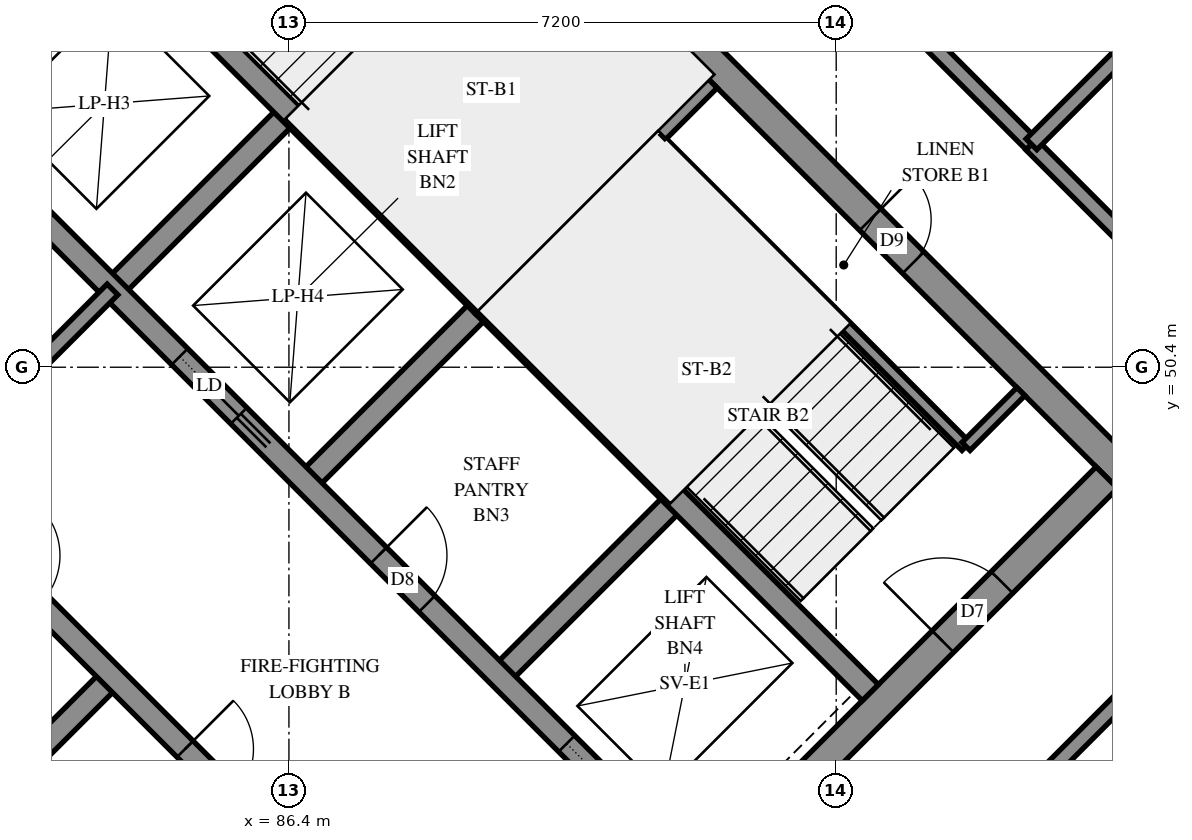
"""IFC4 building model, lengths in metres.
Left out: names, types, materials, properties, quantities, classifications, styles, units other than length and angle.
Written with IfcOpenShell. Run it as: python <this file> out.ifc"""

import sys

from ifc_helpers import new_model, si_unit, direction, frame, frame_2d, origin, place, context, subcontext, project, spatial, polyline, rectangle, outline, extrude, element, fill, save


model = new_model("IFC4")
c1 = context("Model", 3, precision=1e-05, world=origin(), true_north=direction((0.0, 1.0)))
c2 = subcontext(c1, "Body", "Model", "MODEL_VIEW")
j1 = project(units=[si_unit("LENGTHUNIT", "METRE"), si_unit("PLANEANGLEUNIT", "RADIAN")], contexts=[c1])
p1 = place(None, origin())
s1 = spatial("IfcSite", under=j1, at=p1, CompositionType="ELEMENT")
p2 = place(p1, origin())
s2 = spatial("IfcBuilding", under=s1, at=p2, CompositionType="ELEMENT")
p3 = place(p2, frame((0.0, 0.0, 274.4)))
s3 = spatial("IfcBuildingStorey", under=s2, at=p3, CompositionType="ELEMENT", Elevation=274.4)
p4 = place(p3, frame((76.23, 49.231, -0.3), z_axis=(0.0, 0.0, 1.0), x_axis=(0.7071034917, -0.7071100706, 0.0)))
e1 = element("IfcWall", 1, at=p4, inside=s3, PredefinedType="SHEAR", context=c2, shape_type="SweptSolid", body=[
    extrude(rectangle(XDim=15.2, YDim=0.4, at=frame_2d((7.6, 0.0))), origin(), (0.0, 0.0, 1.0), 2.7),
])
p5 = place(p3, frame((86.695, 59.696, -0.3), z_axis=(0.0, 0.0, 1.0), x_axis=(0.7071100706, -0.7071034917, 0.0)))
e2 = element("IfcWall", 2, at=p5, inside=s3, PredefinedType="SHEAR", context=c2, shape_type="SweptSolid", body=[
    extrude(rectangle(XDim=15.2, YDim=0.4, at=frame_2d((7.6, 0.0))), origin(), (0.0, 0.0, 1.0), 2.7),
])
p6 = place(p5, frame((10.4, 0.0, 0.3)))
e3 = element("IfcOpeningElement", 3, at=p6, cuts=e2, PredefinedType="OPENING", context=c2, shape_type="SweptSolid", body=[
    extrude(rectangle(XDim=0.8, YDim=2.1, at=frame_2d((0.4, 1.05))), frame((0.0, 0.21, 0.0), z_axis=(0.0, -1.0, 0.0), x_axis=(1.0, 0.0, 0.0)), (0.0, 0.0, 1.0), 0.42),
])
p7 = place(p3, frame((76.513, 49.231, -0.3), z_axis=(0.0, 0.0, 1.0), x_axis=(0.7071067812, 0.7071067812, 0.0)))
e4 = element("IfcWall", 4, at=p7, inside=s3, PredefinedType="SHEAR", context=c2, shape_type="SweptSolid", body=[
    extrude(rectangle(XDim=14.4, YDim=0.4, at=frame_2d((7.2, 0.0))), origin(), (0.0, 0.0, 1.0), 2.7),
])
p8 = place(p7, frame((4.55, 0.0, 0.3)))
e5 = element("IfcOpeningElement", 5, at=p8, cuts=e4, PredefinedType="OPENING", context=c2, shape_type="SweptSolid", body=[
    extrude(rectangle(XDim=1.1, YDim=2.1, at=frame_2d((0.55, 1.05))), frame((0.0, 0.21, 0.0), z_axis=(0.0, -1.0, 0.0), x_axis=(1.0, 0.0, 0.0)), (0.0, 0.0, 1.0), 0.42),
])
p9 = place(p7, frame((11.35, 0.0, 0.3)))
e6 = element("IfcOpeningElement", 6, at=p9, cuts=e4, PredefinedType="OPENING", context=c2, shape_type="SweptSolid", body=[
    extrude(rectangle(XDim=1.1, YDim=2.1, at=frame_2d((0.55, 1.05))), frame((0.0, 0.21, 0.0), z_axis=(0.0, -1.0, 0.0), x_axis=(1.0, 0.0, 0.0)), (0.0, 0.0, 1.0), 0.42),
])
p10 = place(p3, frame((86.978, 38.766, -0.3), z_axis=(0.0, 0.0, 1.0), x_axis=(0.7071067812, 0.7071067812, 0.0)))
e7 = element("IfcWall", 7, at=p10, inside=s3, PredefinedType="SHEAR", context=c2, shape_type="SweptSolid", body=[
    extrude(rectangle(XDim=14.4, YDim=0.4, at=frame_2d((7.2, 0.0))), origin(), (0.0, 0.0, 1.0), 2.7),
])
p11 = place(p10, frame((4.55, 0.0, 0.3)))
e8 = element("IfcOpeningElement", 8, at=p11, cuts=e7, PredefinedType="OPENING", context=c2, shape_type="SweptSolid", body=[
    extrude(rectangle(XDim=1.1, YDim=2.1, at=frame_2d((0.55, 1.05))), frame((0.0, 0.21, 0.0), z_axis=(0.0, -1.0, 0.0), x_axis=(1.0, 0.0, 0.0)), (0.0, 0.0, 1.0), 0.42),
])
p12 = place(p10, frame((11.35, 0.0, 0.3)))
e9 = element("IfcOpeningElement", 9, at=p12, cuts=e7, PredefinedType="OPENING", context=c2, shape_type="SweptSolid", body=[
    extrude(rectangle(XDim=1.1, YDim=2.1, at=frame_2d((0.55, 1.05))), frame((0.0, 0.21, 0.0), z_axis=(0.0, -1.0, 0.0), x_axis=(1.0, 0.0, 0.0)), (0.0, 0.0, 1.0), 0.42),
])
p13 = place(p3, frame((84.079, 51.423, 0.0), z_axis=(0.0, 0.0, 1.0), x_axis=(0.7071219326, 0.7070916295, 0.0)))
e10 = element("IfcWall", 10, at=p13, inside=s3, PredefinedType="SOLIDWALL", context=c2, shape_type="SweptSolid", body=[
    extrude(rectangle(XDim=3.3, YDim=0.3, at=frame_2d((1.65, 0.0))), origin(), (0.0, 0.0, 1.0), 3.1),
])
p14 = place(p3, frame((81.746, 43.999, 0.0), z_axis=(0.0, 0.0, 1.0), x_axis=(0.7071067812, 0.7071067812, 0.0)))
e11 = element("IfcWall", 11, at=p14, inside=s3, PredefinedType="SOLIDWALL", context=c2, shape_type="SweptSolid", body=[
    extrude(rectangle(XDim=3.3, YDim=0.3, at=frame_2d((1.65, 0.0))), origin(), (0.0, 0.0, 1.0), 3.1),
])
for number, where, z_axis, x_axis in (
    (12, (86.625, 48.878, 0.0), (0.0, 0.0, 1.0), (0.707, 0.707, 0.0)),
    (13, (89.17, 46.332, 0.0), (0.0, 0.0, 1.0), (0.707, 0.707, 0.0)),
):
    element("IfcWall", number, at=place(p3, frame(where, z_axis=z_axis, x_axis=x_axis)), inside=s3, PredefinedType="SOLIDWALL", context=c2, shape_type="SweptSolid", body=[
        extrude(rectangle(XDim=3.3, YDim=0.3, at=frame_2d((1.65, 0.0))), origin(), (0.0, 0.0, 1.0), 3.1),
    ])
p15 = place(p3, frame((78.988, 51.423, 0.0), z_axis=(0.0, 0.0, 1.0), x_axis=(0.7071067812, -0.7071067812, 0.0)))
e14 = element("IfcWall", 14, at=p15, inside=s3, PredefinedType="SOLIDWALL", context=c2, shape_type="SweptSolid", body=[
    extrude(rectangle(XDim=14.4, YDim=0.3, at=frame_2d((7.2, 0.0))), origin(), (0.0, 0.0, 1.0), 3.1),
])
p16 = place(p15, frame((1.35, 0.0, 0.0)))
e15 = element("IfcOpeningElement", 15, at=p16, cuts=e14, PredefinedType="OPENING", context=c2, shape_type="SweptSolid", body=[
    extrude(rectangle(XDim=0.9, YDim=2.1, at=frame_2d((0.45, 1.05))), frame((0.0, 0.16, 0.0), z_axis=(0.0, -1.0, 0.0), x_axis=(1.0, 0.0, 0.0)), (0.0, 0.0, 1.0), 0.32),
])
p17 = place(p15, frame((4.95, 0.0, 0.0)))
e16 = element("IfcOpeningElement", 16, at=p17, cuts=e14, PredefinedType="OPENING", context=c2, shape_type="SweptSolid", body=[
    extrude(rectangle(XDim=0.9, YDim=2.1, at=frame_2d((0.45, 1.05))), frame((0.0, 0.16, 0.0), z_axis=(0.0, -1.0, 0.0), x_axis=(1.0, 0.0, 0.0)), (0.0, 0.0, 1.0), 0.32),
])
p18 = place(p15, frame((8.55, 0.0, 0.0)))
e17 = element("IfcOpeningElement", 17, at=p18, cuts=e14, PredefinedType="OPENING", context=c2, shape_type="SweptSolid", body=[
    extrude(rectangle(XDim=0.9, YDim=2.1, at=frame_2d((0.45, 1.05))), frame((0.0, 0.16, 0.0), z_axis=(0.0, -1.0, 0.0), x_axis=(1.0, 0.0, 0.0)), (0.0, 0.0, 1.0), 0.32),
])
p19 = place(p15, frame((12.05, 0.0, 0.0)))
e18 = element("IfcOpeningElement", 18, at=p19, cuts=e14, PredefinedType="OPENING", context=c2, shape_type="SweptSolid", body=[
    extrude(rectangle(XDim=1.1, YDim=2.1, at=frame_2d((0.55, 1.05))), frame((0.0, 0.16, 0.0), z_axis=(0.0, -1.0, 0.0), x_axis=(1.0, 0.0, 0.0)), (0.0, 0.0, 1.0), 0.32),
])
p20 = place(p3, frame((81.534, 53.969, 0.0), z_axis=(0.0, 0.0, 1.0), x_axis=(0.707103309, -0.7071102534, 0.0)))
e19 = element("IfcWall", 19, at=p20, inside=s3, PredefinedType="SOLIDWALL", context=c2, shape_type="SweptSolid", body=[
    extrude(rectangle(XDim=14.4, YDim=0.3, at=frame_2d((7.2, 0.0))), origin(), (0.0, 0.0, 1.0), 3.1),
])
p21 = place(p20, frame((8.55, 0.0, 0.0)))
e20 = element("IfcOpeningElement", 20, at=p21, cuts=e19, PredefinedType="OPENING", context=c2, shape_type="SweptSolid", body=[
    extrude(rectangle(XDim=0.9, YDim=2.1, at=frame_2d((0.45, 1.05))), frame((0.0, 0.16, 0.0), z_axis=(0.0, -1.0, 0.0), x_axis=(1.0, 0.0, 0.0)), (0.0, 0.0, 1.0), 0.32),
])
p22 = place(p20, frame((1.25, 0.0, 0.0)))
e21 = element("IfcOpeningElement", 21, at=p22, cuts=e19, PredefinedType="OPENING", context=c2, shape_type="SweptSolid", body=[
    extrude(rectangle(XDim=1.1, YDim=2.1, at=frame_2d((0.55, 1.05))), frame((0.0, 0.16, 0.0), z_axis=(0.0, -1.0, 0.0), x_axis=(1.0, 0.0, 0.0)), (0.0, 0.0, 1.0), 0.32),
])
p23 = place(p20, frame((4.85, 0.0, 0.0)))
e22 = element("IfcOpeningElement", 22, at=p23, cuts=e19, PredefinedType="OPENING", context=c2, shape_type="SweptSolid", body=[
    extrude(rectangle(XDim=1.1, YDim=2.1, at=frame_2d((0.55, 1.05))), frame((0.0, 0.16, 0.0), z_axis=(0.0, -1.0, 0.0), x_axis=(1.0, 0.0, 0.0)), (0.0, 0.0, 1.0), 0.32),
])
p24 = place(p20, frame((12.05, 0.0, 0.0)))
e23 = element("IfcOpeningElement", 23, at=p24, cuts=e19, PredefinedType="OPENING", context=c2, shape_type="SweptSolid", body=[
    extrude(rectangle(XDim=1.1, YDim=2.1, at=frame_2d((0.55, 1.05))), frame((0.0, 0.16, 0.0), z_axis=(0.0, -1.0, 0.0), x_axis=(1.0, 0.0, 0.0)), (0.0, 0.0, 1.0), 0.32),
])
for number, where, z_axis, x_axis in (
    (24, (83.867, 56.302, 0.0), (0.0, 0.0, 1.0), (0.707, -0.707, 0.0)),
    (25, (88.958, 51.211, 0.0), (0.0, 0.0, 1.0), (0.707, -0.707, 0.0)),
):
    element("IfcWall", number, at=place(p3, frame(where, z_axis=z_axis, x_axis=x_axis)), inside=s3, PredefinedType="SOLIDWALL", context=c2, shape_type="SweptSolid", body=[
        extrude(rectangle(XDim=7.2, YDim=0.3, at=frame_2d((3.6, 0.0))), origin(), (0.0, 0.0, 1.0), 3.1),
    ])
p25 = place(p3, frame((88.958, 51.211, 0.0), z_axis=(0.0, 0.0, 1.0), x_axis=(0.7071067812, 0.7071067812, 0.0)))
e26 = element("IfcWall", 26, at=p25, inside=s3, PredefinedType="SOLIDWALL", context=c2, shape_type="SweptSolid", body=[
    extrude(rectangle(XDim=4.2, YDim=0.3, at=frame_2d((2.1, 0.0))), origin(), (0.0, 0.0, 1.0), 3.1),
])
p26 = place(p3, frame((100.466, 52.113, 0.0), z_axis=(0.0, 0.0, 1.0), x_axis=(-0.7071067812, 0.7071067812, 0.0)))
e27 = element("IfcWall", 27, at=p26, inside=s3, PredefinedType="SOLIDWALL", context=c2, shape_type="SweptSolid", body=[
    extrude(outline(polyline([(0.038, -0.225), (6.715, -0.225), (6.753, 0.225), (-0.038, 0.225), (0.038, -0.225)])), origin(), (0.0, 0.0, 1.0), 3.1),
])
p27 = place(p26, frame((0.7, 0.0, 0.45)))
e28 = element("IfcOpeningElement", 28, at=p27, cuts=e27, PredefinedType="OPENING", context=c2, shape_type="SweptSolid", body=[
    extrude(rectangle(XDim=2.8, YDim=2.55, at=frame_2d((1.4, 1.275))), frame((0.0, 0.235, 0.0), z_axis=(0.0, -1.0, 0.0), x_axis=(1.0, 0.0, 0.0)), (0.0, 0.0, 1.0), 0.47),
])
p28 = place(p26, frame((4.617, 0.0, 0.45)))
e29 = element("IfcOpeningElement", 29, at=p28, cuts=e27, PredefinedType="OPENING", context=c2, shape_type="SweptSolid", body=[
    extrude(rectangle(XDim=1.2, YDim=2.55, at=frame_2d((0.6, 1.275))), frame((0.0, 0.235, 0.0), z_axis=(0.0, -1.0, 0.0), x_axis=(1.0, 0.0, 0.0)), (0.0, 0.0, 1.0), 0.47),
])
p29 = place(p3, frame((91.313, 53.354, 0.0), z_axis=(0.0, 0.0, 1.0), x_axis=(0.7071067812, -0.7071067812, 0.0)))
e30 = element("IfcWall", 30, at=p29, inside=s3, PredefinedType="PARTITIONING", context=c2, shape_type="SweptSolid", body=[
    extrude(rectangle(XDim=5.65, YDim=0.15, at=frame_2d((2.825, 0.0))), origin(), (0.0, 0.0, 1.0), 3.1),
])
p30 = place(p3, frame((95.308, 49.358, 0.0), z_axis=(0.0, 0.0, 1.0), x_axis=(0.70705776, 0.707155799, 0.0)))
e31 = element("IfcWall", 31, at=p30, inside=s3, PredefinedType="PARTITIONING", context=c2, shape_type="SweptSolid", body=[
    extrude(rectangle(XDim=1.02, YDim=0.15, at=frame_2d((0.51, 0.0))), origin(), (0.0, 0.0, 1.0), 3.1),
])
p31 = place(p3, frame((81.534, 48.878, 0.0), z_axis=(0.0, 0.0, 1.0), x_axis=(0.707092892, 0.7071206701, 0.0)))
e32 = element("IfcWall", 32, at=p31, inside=s3, PredefinedType="PARTITIONING", context=c2, shape_type="SweptSolid", body=[
    extrude(rectangle(XDim=3.6, YDim=0.2, at=frame_2d((1.8, 0.0))), origin(), (0.0, 0.0, 1.0), 3.1),
])
p32 = place(p3, frame((94.332, 43.01, 0.0), z_axis=(0.0, 0.0, 1.0), x_axis=(0.7071067812, 0.7071067812, 0.0)))
e33 = element("IfcWall", 33, at=p32, inside=s3, PredefinedType="PARTITIONING", context=c2, shape_type="SweptSolid", body=[
    extrude(rectangle(XDim=8.598, YDim=0.2, at=frame_2d((4.299, 0.0))), origin(), (0.0, 0.0, 1.0), 3.1),
])
p33 = place(p32, frame((0.255, 0.0, 0.0)))
e34 = element("IfcOpeningElement", 34, at=p33, cuts=e33, PredefinedType="OPENING", context=c2, shape_type="SweptSolid", body=[
    extrude(rectangle(XDim=1.0, YDim=2.1, at=frame_2d((0.5, 1.05))), frame((0.0, 0.11, 0.0), z_axis=(0.0, -1.0, 0.0), x_axis=(1.0, 0.0, 0.0)), (0.0, 0.0, 1.0), 0.22),
])
p34 = place(p3, frame((91.08, 58.424, 0.0), z_axis=(0.0, 0.0, 1.0), x_axis=(0.7069678741, -0.707245661, 0.0)))
e35 = element("IfcWall", 35, at=p34, inside=s3, PredefinedType="PARTITIONING", context=c2, shape_type="SweptSolid", body=[
    extrude(rectangle(XDim=7.2, YDim=0.2, at=frame_2d((3.6, 0.0))), origin(), (0.0, 0.0, 1.0), 3.1),
])
p35 = place(p34, frame((2.084, 0.0, 0.0)))
e36 = element("IfcOpeningElement", 36, at=p35, cuts=e35, PredefinedType="OPENING", context=c2, shape_type="SweptSolid", body=[
    extrude(rectangle(XDim=1.0, YDim=2.1, at=frame_2d((0.5, 1.05))), frame((0.0, 0.11, 0.0), z_axis=(0.0, -1.0, 0.0), x_axis=(1.0, 0.0, 0.0)), (0.0, 0.0, 1.0), 0.22),
])
p36 = place(p3, frame((96.167, 53.329, 0.0), z_axis=(0.0, 0.0, 1.0), x_axis=(0.7071067812, -0.7071067812, 0.0)))
e37 = element("IfcWall", 37, at=p36, inside=s3, PredefinedType="PARTITIONING", context=c2, shape_type="SweptSolid", body=[
    extrude(rectangle(XDim=5.999, YDim=0.2, at=frame_2d((3.0, 0.0))), origin(), (0.0, 0.0, 1.0), 3.1),
])
p37 = place(p3, frame((95.179, 42.161, 0.0), z_axis=(0.0, 0.0, 1.0), x_axis=(0.707115476, 0.7070980863, 0.0)))
e38 = element("IfcWall", 38, at=p37, inside=s3, PredefinedType="PARTITIONING", context=c2, shape_type="SweptSolid", body=[
    extrude(rectangle(XDim=5.75, YDim=0.2, at=frame_2d((2.875, 0.0))), origin(), (0.0, 0.0, 1.0), 3.1),
])
p38 = place(p3, frame((96.169, 53.333, 0.0), z_axis=(0.0, 0.0, 1.0), x_axis=(0.7070811488, 0.7071324126, 0.0)))
e39 = element("IfcWall", 39, at=p38, inside=s3, PredefinedType="PARTITIONING", context=c2, shape_type="SweptSolid", body=[
    extrude(rectangle(XDim=1.951, YDim=0.2, at=frame_2d((0.975, 0.0))), origin(), (0.0, 0.0, 1.0), 3.1),
])
p39 = place(p6, origin())
e40 = element("IfcDoor", 40, at=p39, inside=s3, OperationType="SINGLE_SWING_RIGHT", PredefinedType="DOOR", context=c2, shape_type="SweptSolid", body=[
    extrude(rectangle(XDim=0.8, YDim=2.1, at=frame_2d((0.4, 1.05))), frame((0.0, 0.025, 0.0), z_axis=(0.0, -1.0, 0.0), x_axis=(1.0, 0.0, 0.0)), (0.0, 0.0, 1.0), 0.05),
])
fill(e3, e40)
p40 = place(p12, origin())
e41 = element("IfcDoor", 41, at=p40, inside=s3, OperationType="SINGLE_SWING_RIGHT", PredefinedType="DOOR", context=c2, shape_type="SweptSolid", body=[
    extrude(rectangle(XDim=1.1, YDim=2.1, at=frame_2d((0.55, 1.05))), frame((0.0, 0.025, 0.0), z_axis=(0.0, -1.0, 0.0), x_axis=(1.0, 0.0, 0.0)), (0.0, 0.0, 1.0), 0.05),
])
fill(e9, e41)
p41 = place(p18, origin())
e42 = element("IfcDoor", 42, at=p41, inside=s3, OperationType="SINGLE_SWING_LEFT", PredefinedType="DOOR", context=c2, shape_type="SweptSolid", body=[
    extrude(rectangle(XDim=0.9, YDim=2.1, at=frame_2d((0.45, 1.05))), frame((0.0, 0.025, 0.0), z_axis=(0.0, -1.0, 0.0), x_axis=(1.0, 0.0, 0.0)), (0.0, 0.0, 1.0), 0.05),
])
fill(e17, e42)
p42 = place(p21, origin())
e43 = element("IfcDoor", 43, at=p42, inside=s3, OperationType="SINGLE_SWING_LEFT", PredefinedType="DOOR", context=c2, shape_type="SweptSolid", body=[
    extrude(rectangle(XDim=0.9, YDim=2.1, at=frame_2d((0.45, 1.05))), frame((0.0, 0.025, 0.0), z_axis=(0.0, -1.0, 0.0), x_axis=(1.0, 0.0, 0.0)), (0.0, 0.0, 1.0), 0.05),
])
fill(e20, e43)
p43 = place(p23, origin())
e44 = element("IfcDoor", 44, at=p43, inside=s3, OperationType="SLIDING_TO_RIGHT", PredefinedType="DOOR", context=c2, shape_type="SweptSolid", body=[
    extrude(rectangle(XDim=1.1, YDim=2.1, at=frame_2d((0.55, 1.05))), frame((0.0, 0.025, 0.0), z_axis=(0.0, -1.0, 0.0), x_axis=(1.0, 0.0, 0.0)), (0.0, 0.0, 1.0), 0.05),
])
fill(e22, e44)
p44 = place(p24, origin())
e45 = element("IfcDoor", 45, at=p44, inside=s3, OperationType="SLIDING_TO_RIGHT", PredefinedType="DOOR", context=c2, shape_type="SweptSolid", body=[
    extrude(rectangle(XDim=1.1, YDim=2.1, at=frame_2d((0.55, 1.05))), frame((0.0, 0.025, 0.0), z_axis=(0.0, -1.0, 0.0), x_axis=(1.0, 0.0, 0.0)), (0.0, 0.0, 1.0), 0.05),
])
fill(e23, e45)
save(model, sys.argv[1])
